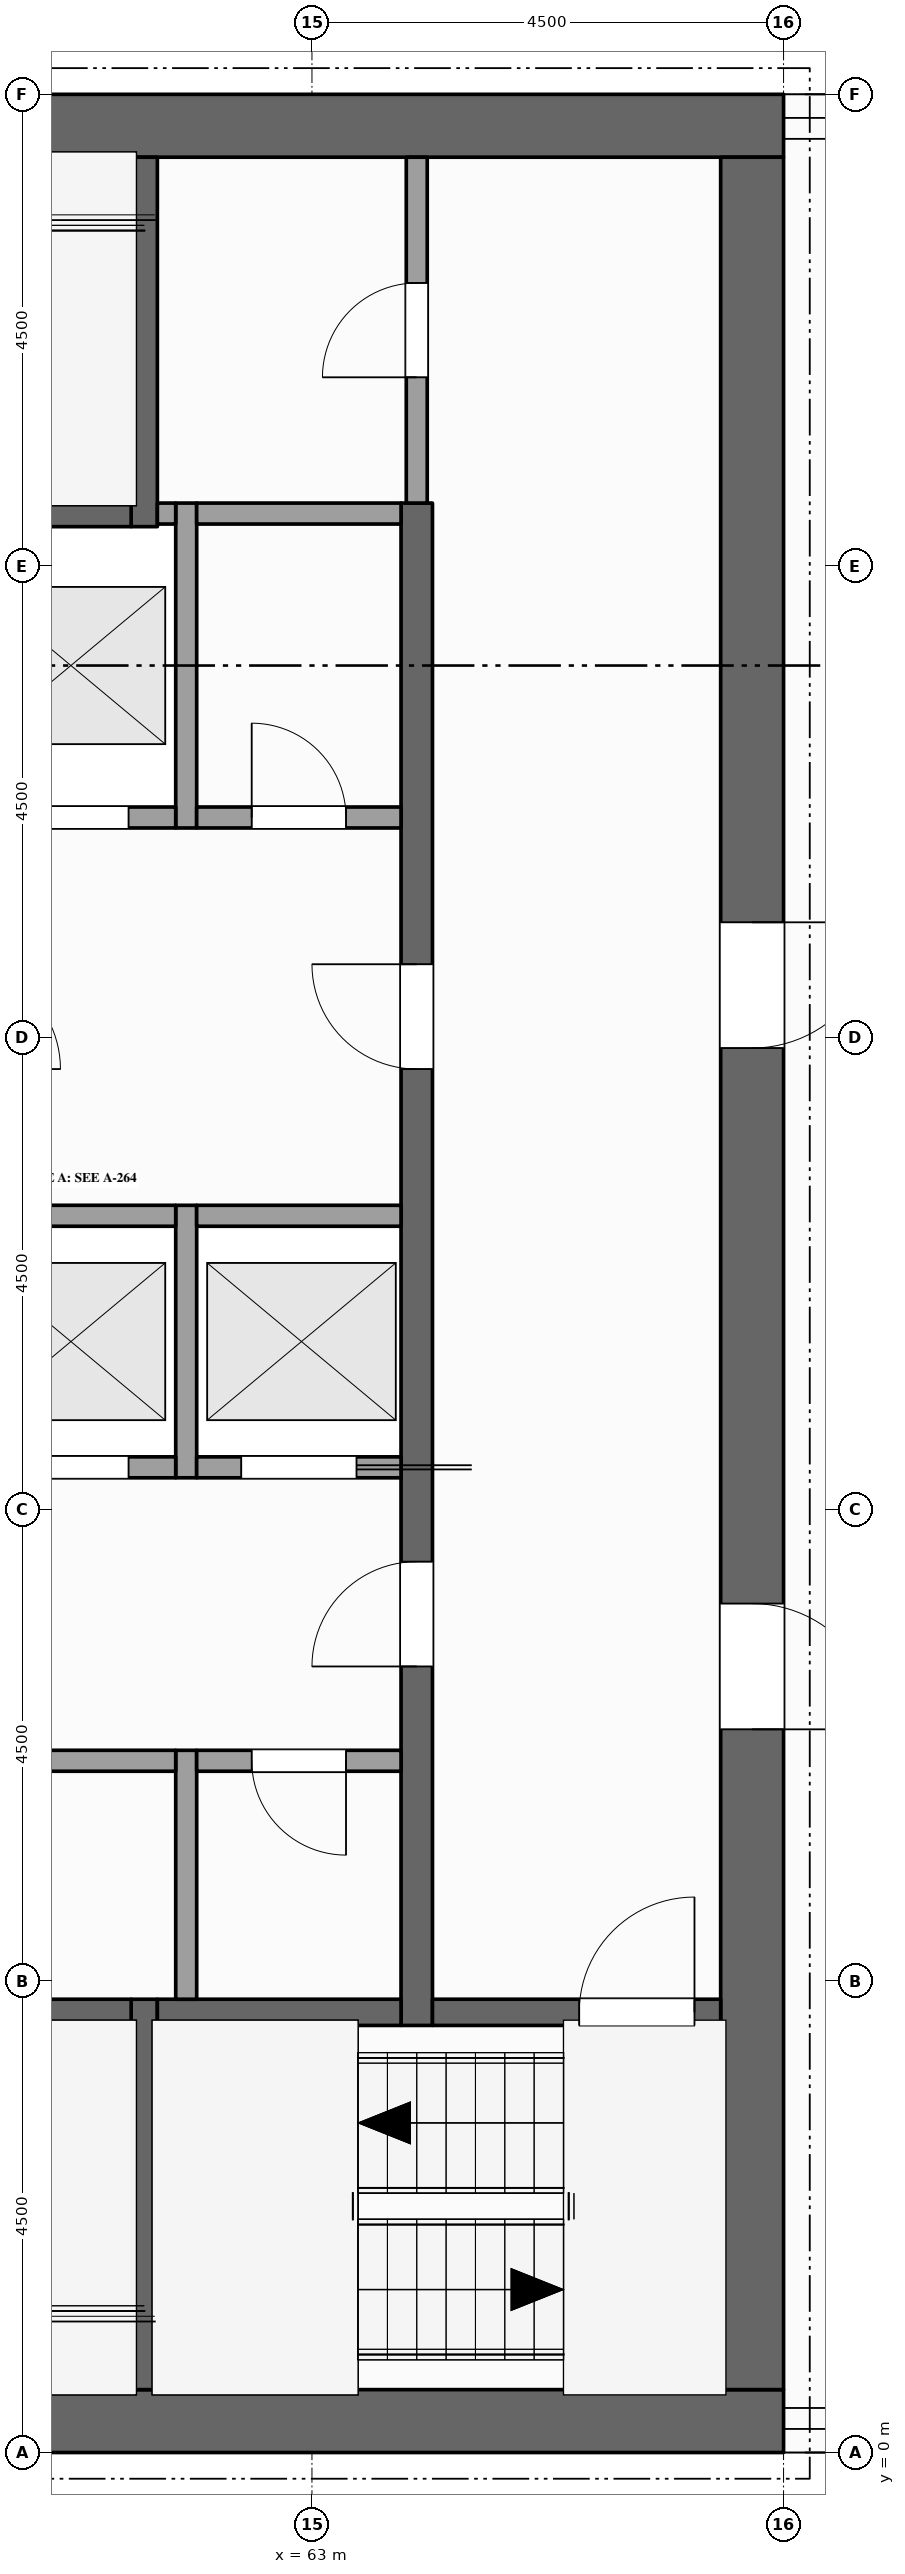
"""IFC4 building model, lengths in metres.
Left out: names, types, materials, properties, quantities, classifications, styles, units other than length and angle.
Written with IfcOpenShell. Run it as: python <this file> out.ifc"""

import sys

from ifc_helpers import new_model, si_unit, direction, frame, frame_2d, origin, place, context, subcontext, project, spatial, rectangle, extrude, element, fill, save


model = new_model("IFC4")
c1 = context("Model", 3, precision=1e-05, world=origin(), true_north=direction((0.0, 1.0)))
c2 = subcontext(c1, "Body", "Model", "MODEL_VIEW")
j1 = project(units=[si_unit("LENGTHUNIT", "METRE"), si_unit("PLANEANGLEUNIT", "RADIAN")], contexts=[c1])
p1 = place(None, origin())
s1 = spatial("IfcSite", under=j1, at=p1, CompositionType="ELEMENT")
p2 = place(p1, origin())
s2 = spatial("IfcBuilding", under=s1, at=p2, CompositionType="ELEMENT")
p3 = place(p2, frame((0.0, 0.0, 350.5)))
s3 = spatial("IfcBuildingStorey", under=s2, at=p3, CompositionType="ELEMENT", Elevation=350.5)
for number, where, z_axis, x_axis in (
    (1, (67.5, 0.3, -0.15), (0.0, 0.0, 1.0), (-1.0, 0.0, 0.0)),
    (2, (54.0, 22.2, -0.15), (0.0, 0.0, 1.0), (1.0, 0.0, 0.0)),
):
    element("IfcWall", number, at=place(p3, frame(where, z_axis=z_axis, x_axis=x_axis)), inside=s3, PredefinedType="SHEAR", context=c2, shape_type="SweptSolid", body=[
        extrude(rectangle(XDim=13.5, YDim=0.6, at=frame_2d((6.75, 0.0))), origin(), (0.0, 0.0, 1.0), 5.0),
    ])
p4 = place(p3, frame((67.2, 0.6, -0.15), z_axis=(0.0, 0.0, 1.0), x_axis=(0.0, 1.0, 0.0)))
e3 = element("IfcWall", 3, at=p4, inside=s3, PredefinedType="SHEAR", context=c2, shape_type="SweptSolid", body=[
    extrude(rectangle(XDim=21.3, YDim=0.6, at=frame_2d((10.65, 0.0))), origin(), (0.0, 0.0, 1.0), 5.0),
])
p5 = place(p4, frame((6.3, 0.0, 0.15)))
e4 = element("IfcOpeningElement", 4, at=p5, cuts=e3, PredefinedType="OPENING", context=c2, shape_type="SweptSolid", body=[
    extrude(rectangle(XDim=1.2, YDim=2.1, at=frame_2d((0.6, 1.05))), frame((0.0, 0.31, 0.0), z_axis=(0.0, -1.0, 0.0), x_axis=(1.0, 0.0, 0.0)), (0.0, 0.0, 1.0), 0.62),
])
p6 = place(p4, frame((12.8, 0.0, 0.15)))
e5 = element("IfcOpeningElement", 5, at=p6, cuts=e3, PredefinedType="OPENING", context=c2, shape_type="SweptSolid", body=[
    extrude(rectangle(XDim=1.2, YDim=2.1, at=frame_2d((0.6, 1.05))), frame((0.0, 0.31, 0.0), z_axis=(0.0, -1.0, 0.0), x_axis=(1.0, 0.0, 0.0)), (0.0, 0.0, 1.0), 0.62),
])
p7 = place(p3, frame((61.4, 0.6, 0.0), z_axis=(0.0, 0.0, 1.0), x_axis=(0.0, 1.0, 0.0)))
e6 = element("IfcWall", 6, at=p7, inside=s3, PredefinedType="SHEAR", context=c2, shape_type="SweptSolid", body=[
    extrude(rectangle(XDim=3.725, YDim=0.25, at=frame_2d((1.862, 0.0))), origin(), (0.0, 0.0, 1.0), 4.75),
])
p8 = place(p3, frame((61.4, 18.375, 0.0), z_axis=(0.0, 0.0, 1.0), x_axis=(0.0, 1.0, 0.0)))
e7 = element("IfcWall", 7, at=p8, inside=s3, PredefinedType="SHEAR", context=c2, shape_type="SweptSolid", body=[
    extrude(rectangle(XDim=3.525, YDim=0.25, at=frame_2d((1.762, 0.0))), origin(), (0.0, 0.0, 1.0), 4.75),
])
p9 = place(p3, frame((61.8, 4.325, 0.0), z_axis=(0.0, 0.0, 1.0), x_axis=(0.0, 1.0, 0.0)))
e8 = element("IfcWall", 8, at=p9, inside=s3, PredefinedType="PARTITIONING", context=c2, shape_type="SweptSolid", body=[
    extrude(rectangle(XDim=2.375, YDim=0.2, at=frame_2d((1.188, 0.0))), origin(), (0.0, 0.0, 1.0), 4.75),
])
p10 = place(p3, frame((61.8, 9.3, 0.0), z_axis=(0.0, 0.0, 1.0), x_axis=(0.0, 1.0, 0.0)))
e9 = element("IfcWall", 9, at=p10, inside=s3, PredefinedType="SOLIDWALL", context=c2, shape_type="SweptSolid", body=[
    extrude(rectangle(XDim=2.6, YDim=0.2, at=frame_2d((1.3, 0.0))), origin(), (0.0, 0.0, 1.0), 4.75),
])
p11 = place(p3, frame((61.8, 15.5, 0.0), z_axis=(0.0, 0.0, 1.0), x_axis=(0.0, 1.0, 0.0)))
e10 = element("IfcWall", 10, at=p11, inside=s3, PredefinedType="SOLIDWALL", context=c2, shape_type="SweptSolid", body=[
    extrude(rectangle(XDim=3.1, YDim=0.2, at=frame_2d((1.55, 0.0))), origin(), (0.0, 0.0, 1.0), 4.75),
])
p12 = place(p3, frame((64.0, 4.075, 0.0), z_axis=(0.0, 0.0, 1.0), x_axis=(0.0, 1.0, 0.0)))
e11 = element("IfcWall", 11, at=p12, inside=s3, PredefinedType="SHEAR", context=c2, shape_type="SweptSolid", body=[
    extrude(rectangle(XDim=14.525, YDim=0.3, at=frame_2d((7.263, 0.0))), origin(), (0.0, 0.0, 1.0), 4.75),
])
p13 = place(p12, frame((3.425, 0.0, 0.0)))
e12 = element("IfcOpeningElement", 12, at=p13, cuts=e11, PredefinedType="OPENING", context=c2, shape_type="SweptSolid", body=[
    extrude(rectangle(XDim=1.0, YDim=2.1, at=frame_2d((0.5, 1.05))), frame((0.0, 0.16, 0.0), z_axis=(0.0, -1.0, 0.0), x_axis=(1.0, 0.0, 0.0)), (0.0, 0.0, 1.0), 0.32),
])
p14 = place(p12, frame((9.125, 0.0, 0.0)))
e13 = element("IfcOpeningElement", 13, at=p14, cuts=e11, PredefinedType="OPENING", context=c2, shape_type="SweptSolid", body=[
    extrude(rectangle(XDim=1.0, YDim=2.1, at=frame_2d((0.5, 1.05))), frame((0.0, 0.16, 0.0), z_axis=(0.0, -1.0, 0.0), x_axis=(1.0, 0.0, 0.0)), (0.0, 0.0, 1.0), 0.32),
])
p15 = place(p3, frame((64.0, 18.6, 0.0), z_axis=(0.0, 0.0, 1.0), x_axis=(0.0, 1.0, 0.0)))
e14 = element("IfcWall", 14, at=p15, inside=s3, PredefinedType="PARTITIONING", context=c2, shape_type="SweptSolid", body=[
    extrude(rectangle(XDim=3.3, YDim=0.2, at=frame_2d((1.65, 0.0))), origin(), (0.0, 0.0, 1.0), 4.75),
])
p16 = place(p15, frame((1.2, 0.0, 0.0)))
e15 = element("IfcOpeningElement", 15, at=p16, cuts=e14, PredefinedType="OPENING", context=c2, shape_type="SweptSolid", body=[
    extrude(rectangle(XDim=0.9, YDim=2.1, at=frame_2d((0.45, 1.05))), frame((0.0, 0.11, 0.0), z_axis=(0.0, -1.0, 0.0), x_axis=(1.0, 0.0, 0.0)), (0.0, 0.0, 1.0), 0.22),
])
p17 = place(p3, frame((54.6, 4.2, 0.0), z_axis=(0.0, 0.0, 1.0), x_axis=(1.0, 0.0, 0.0)))
e16 = element("IfcWall", 16, at=p17, inside=s3, PredefinedType="SHEAR", context=c2, shape_type="SweptSolid", body=[
    extrude(rectangle(XDim=6.675, YDim=0.25, at=frame_2d((3.337, 0.0))), origin(), (0.0, 0.0, 1.0), 4.75),
])
p18 = place(p3, frame((61.525, 4.2, 0.0), z_axis=(0.0, 0.0, 1.0), x_axis=(1.0, 0.0, 0.0)))
e17 = element("IfcWall", 17, at=p18, inside=s3, PredefinedType="SHEAR", context=c2, shape_type="SweptSolid", body=[
    extrude(rectangle(XDim=2.325, YDim=0.25, at=frame_2d((1.163, 0.0))), origin(), (0.0, 0.0, 1.0), 4.75),
])
p19 = place(p3, frame((64.15, 4.2, 0.0), z_axis=(0.0, 0.0, 1.0), x_axis=(1.0, 0.0, 0.0)))
e18 = element("IfcWall", 18, at=p19, inside=s3, PredefinedType="SHEAR", context=c2, shape_type="SweptSolid", body=[
    extrude(rectangle(XDim=2.75, YDim=0.25, at=frame_2d((1.375, 0.0))), origin(), (0.0, 0.0, 1.0), 4.75),
])
p20 = place(p19, frame((1.4, 0.0, 0.0)))
e19 = element("IfcOpeningElement", 19, at=p20, cuts=e18, PredefinedType="OPENING", context=c2, shape_type="SweptSolid", body=[
    extrude(rectangle(XDim=1.1, YDim=2.1, at=frame_2d((0.55, 1.05))), frame((0.0, 0.135, 0.0), z_axis=(0.0, -1.0, 0.0), x_axis=(1.0, 0.0, 0.0)), (0.0, 0.0, 1.0), 0.27),
])
p21 = place(p3, frame((54.6, 6.6, 0.0), z_axis=(0.0, 0.0, 1.0), x_axis=(1.0, 0.0, 0.0)))
e20 = element("IfcWall", 20, at=p21, inside=s3, PredefinedType="PARTITIONING", context=c2, shape_type="SweptSolid", body=[
    extrude(rectangle(XDim=7.1, YDim=0.2, at=frame_2d((3.55, 0.0))), origin(), (0.0, 0.0, 1.0), 4.75),
])
p22 = place(p21, frame((3.1, 0.0, 0.0)))
e21 = element("IfcOpeningElement", 21, at=p22, cuts=e20, PredefinedType="OPENING", context=c2, shape_type="SweptSolid", body=[
    extrude(rectangle(XDim=0.9, YDim=2.1, at=frame_2d((0.45, 1.05))), frame((0.0, 0.11, 0.0), z_axis=(0.0, -1.0, 0.0), x_axis=(1.0, 0.0, 0.0)), (0.0, 0.0, 1.0), 0.22),
])
p23 = place(p3, frame((61.9, 6.6, 0.0), z_axis=(0.0, 0.0, 1.0), x_axis=(1.0, 0.0, 0.0)))
e22 = element("IfcWall", 22, at=p23, inside=s3, PredefinedType="PARTITIONING", context=c2, shape_type="SweptSolid", body=[
    extrude(rectangle(XDim=1.95, YDim=0.2, at=frame_2d((0.975, 0.0))), origin(), (0.0, 0.0, 1.0), 4.75),
])
p24 = place(p23, frame((0.525, 0.0, 0.0)))
e23 = element("IfcOpeningElement", 23, at=p24, cuts=e22, PredefinedType="OPENING", context=c2, shape_type="SweptSolid", body=[
    extrude(rectangle(XDim=0.9, YDim=2.1, at=frame_2d((0.45, 1.05))), frame((0.0, 0.11, 0.0), z_axis=(0.0, -1.0, 0.0), x_axis=(1.0, 0.0, 0.0)), (0.0, 0.0, 1.0), 0.22),
])
p25 = place(p3, frame((59.7, 9.4, 0.0), z_axis=(0.0, 0.0, 1.0), x_axis=(1.0, 0.0, 0.0)))
e24 = element("IfcWall", 24, at=p25, inside=s3, PredefinedType="SOLIDWALL", context=c2, shape_type="SweptSolid", body=[
    extrude(rectangle(XDim=2.0, YDim=0.2, at=frame_2d((1.0, 0.0))), origin(), (0.0, 0.0, 1.0), 4.75),
])
p26 = place(p25, frame((0.45, 0.0, 0.012)))
e25 = element("IfcOpeningElement", 25, at=p26, cuts=e24, PredefinedType="OPENING", context=c2, shape_type="SweptSolid", body=[
    extrude(rectangle(XDim=1.1, YDim=2.1, at=frame_2d((0.55, 1.05))), frame((0.0, 0.11, 0.0), z_axis=(0.0, -1.0, 0.0), x_axis=(1.0, 0.0, 0.0)), (0.0, 0.0, 1.0), 0.22),
])
p27 = place(p3, frame((61.9, 9.4, 0.0), z_axis=(0.0, 0.0, 1.0), x_axis=(1.0, 0.0, 0.0)))
e26 = element("IfcWall", 26, at=p27, inside=s3, PredefinedType="SOLIDWALL", context=c2, shape_type="SweptSolid", body=[
    extrude(rectangle(XDim=1.95, YDim=0.2, at=frame_2d((0.975, 0.0))), origin(), (0.0, 0.0, 1.0), 4.75),
])
p28 = place(p27, frame((0.425, 0.0, 0.012)))
e27 = element("IfcOpeningElement", 27, at=p28, cuts=e26, PredefinedType="OPENING", context=c2, shape_type="SweptSolid", body=[
    extrude(rectangle(XDim=1.1, YDim=2.1, at=frame_2d((0.55, 1.05))), frame((0.0, 0.11, 0.0), z_axis=(0.0, -1.0, 0.0), x_axis=(1.0, 0.0, 0.0)), (0.0, 0.0, 1.0), 0.22),
])
p29 = place(p3, frame((59.7, 11.8, 0.0), z_axis=(0.0, 0.0, 1.0), x_axis=(1.0, 0.0, 0.0)))
e28 = element("IfcWall", 28, at=p29, inside=s3, PredefinedType="SOLIDWALL", context=c2, shape_type="SweptSolid", body=[
    extrude(rectangle(XDim=2.0, YDim=0.2, at=frame_2d((1.0, 0.0))), origin(), (0.0, 0.0, 1.0), 4.75),
])
p30 = place(p3, frame((61.9, 11.8, 0.0), z_axis=(0.0, 0.0, 1.0), x_axis=(1.0, 0.0, 0.0)))
e29 = element("IfcWall", 29, at=p30, inside=s3, PredefinedType="SOLIDWALL", context=c2, shape_type="SweptSolid", body=[
    extrude(rectangle(XDim=1.95, YDim=0.2, at=frame_2d((0.975, 0.0))), origin(), (0.0, 0.0, 1.0), 4.75),
])
p31 = place(p3, frame((59.7, 15.6, 0.0), z_axis=(0.0, 0.0, 1.0), x_axis=(1.0, 0.0, 0.0)))
e30 = element("IfcWall", 30, at=p31, inside=s3, PredefinedType="SOLIDWALL", context=c2, shape_type="SweptSolid", body=[
    extrude(rectangle(XDim=2.0, YDim=0.2, at=frame_2d((1.0, 0.0))), origin(), (0.0, 0.0, 1.0), 4.75),
])
p32 = place(p31, frame((0.45, 0.0, 0.012)))
e31 = element("IfcOpeningElement", 31, at=p32, cuts=e30, PredefinedType="OPENING", context=c2, shape_type="SweptSolid", body=[
    extrude(rectangle(XDim=1.1, YDim=2.1, at=frame_2d((0.55, 1.05))), frame((0.0, 0.11, 0.0), z_axis=(0.0, -1.0, 0.0), x_axis=(1.0, 0.0, 0.0)), (0.0, 0.0, 1.0), 0.22),
])
p33 = place(p3, frame((61.9, 15.6, 0.0), z_axis=(0.0, 0.0, 1.0), x_axis=(1.0, 0.0, 0.0)))
e32 = element("IfcWall", 32, at=p33, inside=s3, PredefinedType="PARTITIONING", context=c2, shape_type="SweptSolid", body=[
    extrude(rectangle(XDim=1.95, YDim=0.2, at=frame_2d((0.975, 0.0))), origin(), (0.0, 0.0, 1.0), 4.75),
])
p34 = place(p33, frame((0.525, 0.0, 0.0)))
e33 = element("IfcOpeningElement", 33, at=p34, cuts=e32, PredefinedType="OPENING", context=c2, shape_type="SweptSolid", body=[
    extrude(rectangle(XDim=0.9, YDim=2.1, at=frame_2d((0.45, 1.05))), frame((0.0, 0.11, 0.0), z_axis=(0.0, -1.0, 0.0), x_axis=(1.0, 0.0, 0.0)), (0.0, 0.0, 1.0), 0.22),
])
p35 = place(p3, frame((54.6, 18.5, 0.0), z_axis=(0.0, 0.0, 1.0), x_axis=(1.0, 0.0, 0.0)))
e34 = element("IfcWall", 34, at=p35, inside=s3, PredefinedType="SHEAR", context=c2, shape_type="SweptSolid", body=[
    extrude(rectangle(XDim=6.675, YDim=0.25, at=frame_2d((3.337, 0.0))), origin(), (0.0, 0.0, 1.0), 4.75),
])
p36 = place(p3, frame((61.525, 18.5, 0.0), z_axis=(0.0, 0.0, 1.0), x_axis=(1.0, 0.0, 0.0)))
e35 = element("IfcWall", 35, at=p36, inside=s3, PredefinedType="SOLIDWALL", context=c2, shape_type="SweptSolid", body=[
    extrude(rectangle(XDim=0.175, YDim=0.2, at=frame_2d((0.087, 0.0))), origin(), (0.0, 0.0, 1.0), 4.75),
])
p37 = place(p3, frame((61.9, 18.5, 0.0), z_axis=(0.0, 0.0, 1.0), x_axis=(1.0, 0.0, 0.0)))
e36 = element("IfcWall", 36, at=p37, inside=s3, PredefinedType="PARTITIONING", context=c2, shape_type="SweptSolid", body=[
    extrude(rectangle(XDim=1.95, YDim=0.2, at=frame_2d((0.975, 0.0))), origin(), (0.0, 0.0, 1.0), 4.75),
])
p38 = place(p26, origin())
e37 = element("IfcDoor", 37, at=p38, inside=s3, OperationType="SLIDING_TO_LEFT", PredefinedType="DOOR", context=c2, shape_type="SweptSolid", body=[
    extrude(rectangle(XDim=1.1, YDim=2.1, at=frame_2d((0.55, 1.05))), frame((0.0, 0.025, 0.0), z_axis=(0.0, -1.0, 0.0), x_axis=(1.0, 0.0, 0.0)), (0.0, 0.0, 1.0), 0.05),
])
fill(e25, e37)
p39 = place(p28, origin())
e38 = element("IfcDoor", 38, at=p39, inside=s3, OperationType="SLIDING_TO_RIGHT", PredefinedType="DOOR", context=c2, shape_type="SweptSolid", body=[
    extrude(rectangle(XDim=1.1, YDim=2.1, at=frame_2d((0.55, 1.05))), frame((0.0, 0.025, 0.0), z_axis=(0.0, -1.0, 0.0), x_axis=(1.0, 0.0, 0.0)), (0.0, 0.0, 1.0), 0.05),
])
fill(e27, e38)
p40 = place(p32, origin())
e39 = element("IfcDoor", 39, at=p40, inside=s3, OperationType="SLIDING_TO_LEFT", PredefinedType="DOOR", context=c2, shape_type="SweptSolid", body=[
    extrude(rectangle(XDim=1.1, YDim=2.1, at=frame_2d((0.55, 1.05))), frame((0.0, 0.025, 0.0), z_axis=(0.0, -1.0, 0.0), x_axis=(1.0, 0.0, 0.0)), (0.0, 0.0, 1.0), 0.05),
])
fill(e31, e39)
p41 = place(p13, origin())
e40 = element("IfcDoor", 40, at=p41, inside=s3, OperationType="SINGLE_SWING_LEFT", PredefinedType="DOOR", context=c2, shape_type="SweptSolid", body=[
    extrude(rectangle(XDim=1.0, YDim=2.1, at=frame_2d((0.5, 1.05))), frame((0.0, 0.025, 0.0), z_axis=(0.0, -1.0, 0.0), x_axis=(1.0, 0.0, 0.0)), (0.0, 0.0, 1.0), 0.05),
])
fill(e12, e40)
p42 = place(p14, origin())
e41 = element("IfcDoor", 41, at=p42, inside=s3, OperationType="SINGLE_SWING_RIGHT", PredefinedType="DOOR", context=c2, shape_type="SweptSolid", body=[
    extrude(rectangle(XDim=1.0, YDim=2.1, at=frame_2d((0.5, 1.05))), frame((0.0, 0.025, 0.0), z_axis=(0.0, -1.0, 0.0), x_axis=(1.0, 0.0, 0.0)), (0.0, 0.0, 1.0), 0.05),
])
fill(e13, e41)
p43 = place(p20, origin())
e42 = element("IfcDoor", 42, at=p43, inside=s3, OperationType="SINGLE_SWING_RIGHT", PredefinedType="DOOR", context=c2, shape_type="SweptSolid", body=[
    extrude(rectangle(XDim=1.1, YDim=2.1, at=frame_2d((0.55, 1.05))), frame((0.0, 0.025, 0.0), z_axis=(0.0, -1.0, 0.0), x_axis=(1.0, 0.0, 0.0)), (0.0, 0.0, 1.0), 0.05),
])
fill(e19, e42)
p44 = place(p16, origin())
e43 = element("IfcDoor", 43, at=p44, inside=s3, OperationType="SINGLE_SWING_LEFT", PredefinedType="DOOR", context=c2, shape_type="SweptSolid", body=[
    extrude(rectangle(XDim=0.9, YDim=2.1, at=frame_2d((0.45, 1.05))), frame((0.0, 0.025, 0.0), z_axis=(0.0, -1.0, 0.0), x_axis=(1.0, 0.0, 0.0)), (0.0, 0.0, 1.0), 0.05),
])
fill(e15, e43)
p45 = place(p24, origin())
e44 = element("IfcDoor", 44, at=p45, inside=s3, OperationType="SINGLE_SWING_RIGHT", PredefinedType="DOOR", context=c2, shape_type="SweptSolid", body=[
    extrude(rectangle(XDim=0.9, YDim=2.1, at=frame_2d((0.45, 1.05))), frame((0.0, 0.025, 0.0), z_axis=(0.0, -1.0, 0.0), x_axis=(1.0, 0.0, 0.0)), (0.0, 0.0, 1.0), 0.05),
])
fill(e23, e44)
p46 = place(p34, origin())
e45 = element("IfcDoor", 45, at=p46, inside=s3, OperationType="SINGLE_SWING_LEFT", PredefinedType="DOOR", context=c2, shape_type="SweptSolid", body=[
    extrude(rectangle(XDim=0.9, YDim=2.1, at=frame_2d((0.45, 1.05))), frame((0.0, 0.025, 0.0), z_axis=(0.0, -1.0, 0.0), x_axis=(1.0, 0.0, 0.0)), (0.0, 0.0, 1.0), 0.05),
])
fill(e33, e45)
p47 = place(p5, origin())
e46 = element("IfcDoor", 46, at=p47, inside=s3, OperationType="SINGLE_SWING_LEFT", PredefinedType="DOOR", context=c2, shape_type="SweptSolid", body=[
    extrude(rectangle(XDim=1.2, YDim=2.1, at=frame_2d((0.6, 1.05))), frame((0.0, 0.025, 0.0), z_axis=(0.0, -1.0, 0.0), x_axis=(1.0, 0.0, 0.0)), (0.0, 0.0, 1.0), 0.05),
])
fill(e4, e46)
p48 = place(p6, origin())
e47 = element("IfcDoor", 47, at=p48, inside=s3, OperationType="SINGLE_SWING_RIGHT", PredefinedType="DOOR", context=c2, shape_type="SweptSolid", body=[
    extrude(rectangle(XDim=1.2, YDim=2.1, at=frame_2d((0.6, 1.05))), frame((0.0, 0.025, 0.0), z_axis=(0.0, -1.0, 0.0), x_axis=(1.0, 0.0, 0.0)), (0.0, 0.0, 1.0), 0.05),
])
fill(e5, e47)
save(model, sys.argv[1])
